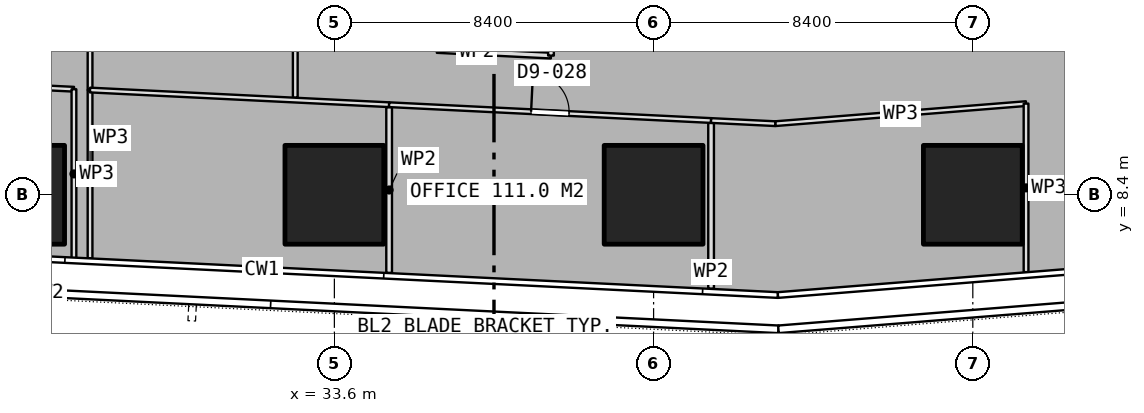
"""IFC4 building model, lengths in metres.
Left out: names, types, materials, properties, quantities, classifications, styles, units other than length and angle.
Written with IfcOpenShell. Run it as: python <this file> out.ifc"""

import sys

from ifc_helpers import new_model, si_unit, direction, frame, frame_2d, origin, origin_2d, place, context, subcontext, project, spatial, rectangle, extrude, element, fill, save


model = new_model("IFC4")
c1 = context("Model", 3, precision=1e-05, world=origin(), true_north=direction((0.0, 1.0)))
c2 = subcontext(c1, "Body", "Model", "MODEL_VIEW")
j1 = project(units=[si_unit("LENGTHUNIT", "METRE"), si_unit("PLANEANGLEUNIT", "RADIAN")], contexts=[c1])
p1 = place(None, origin())
s1 = spatial("IfcSite", under=j1, at=p1, CompositionType="ELEMENT")
p2 = place(p1, origin())
s2 = spatial("IfcBuilding", under=s1, at=p2, CompositionType="ELEMENT")
p3 = place(p2, frame((0.0, 0.0, 29.15)))
s3 = spatial("IfcBuildingStorey", under=s2, at=p3, CompositionType="ELEMENT", Elevation=29.15)
for number, where, z_axis, x_axis in (
    (1, (25.2, 8.4, 0.0), (0.0, 0.0, 1.0), (1.0, 0.0, 0.0)),
    (2, (33.6, 8.4, 0.0), (0.0, 0.0, 1.0), (1.0, 0.0, 0.0)),
    (3, (42.0, 8.4, 0.0), (0.0, 0.0, 1.0), (1.0, 0.0, 0.0)),
    (4, (50.4, 8.4, 0.0), (0.0, 0.0, 1.0), (1.0, 0.0, 0.0)),
):
    element("IfcColumn", number, at=place(p3, frame(where, z_axis=z_axis, x_axis=x_axis)), inside=s3, PredefinedType="COLUMN", context=c2, shape_type="SweptSolid", body=[
        extrude(rectangle(XDim=2.6, YDim=2.6, at=origin_2d()), origin(), (0.0, 0.0, 1.0), 3.75),
    ])
p4 = place(p3, frame((27.171, 11.156, 0.0), z_axis=(0.0, 0.0, 1.0), x_axis=(0.998799184112, -0.048991732132, 0.0)))
e5 = element("IfcWall", 5, at=p4, inside=s3, PredefinedType="PARTITIONING", context=c2, shape_type="SweptSolid", body=[
    extrude(rectangle(XDim=7.879, YDim=0.125, at=frame_2d((3.939, 0.0))), origin(), (0.0, 0.0, 1.0), 3.5),
])
p5 = place(p3, frame((35.04, 10.77, 0.0), z_axis=(0.0, 0.0, 1.0), x_axis=(0.998796515078, -0.049046115723, 0.0)))
e6 = element("IfcWall", 6, at=p5, inside=s3, PredefinedType="PARTITIONING", context=c2, shape_type="SweptSolid", body=[
    extrude(rectangle(XDim=8.482, YDim=0.125, at=frame_2d((4.241, 0.0))), origin(), (0.0, 0.0, 1.0), 3.5),
])
p6 = place(p5, frame((3.741, 0.0, 0.0)))
e7 = element("IfcOpeningElement", 7, at=p6, cuts=e6, PredefinedType="OPENING", context=c2, shape_type="SweptSolid", body=[
    extrude(rectangle(XDim=1.0, YDim=2.1, at=frame_2d((0.5, 1.05))), frame((0.0, 0.073, 0.0), z_axis=(0.0, -1.0, 0.0), x_axis=(1.0, 0.0, 0.0)), (0.0, 0.0, 1.0), 0.145),
])
p7 = place(p3, frame((43.512, 10.354, 0.0), z_axis=(0.0, 0.0, 1.0), x_axis=(0.998795852564, -0.049059605587, 0.0)))
e8 = element("IfcWall", 8, at=p7, inside=s3, PredefinedType="PARTITIONING", context=c2, shape_type="SweptSolid", body=[
    extrude(rectangle(XDim=1.692, YDim=0.125, at=frame_2d((0.846, 0.0))), origin(), (0.0, 0.0, 1.0), 3.5),
])
p8 = place(p3, frame((45.202, 10.271, 0.0), z_axis=(0.0, 0.0, 1.0), x_axis=(0.996813519404, 0.079767208379, 0.0)))
e9 = element("IfcWall", 9, at=p8, inside=s3, PredefinedType="PARTITIONING", context=c2, shape_type="SweptSolid", body=[
    extrude(rectangle(XDim=6.62, YDim=0.125, at=frame_2d((3.31, 0.0))), origin(), (0.0, 0.0, 1.0), 3.5),
])
p9 = place(p3, frame((51.801, 10.799, 0.0), z_axis=(0.0, 0.0, 1.0), x_axis=(0.0, -1.0, 0.0)))
e10 = element("IfcWall", 10, at=p9, inside=s3, PredefinedType="PARTITIONING", context=c2, shape_type="SweptSolid", body=[
    extrude(rectangle(XDim=4.434, YDim=0.125, at=frame_2d((2.217, 0.0))), origin(), (0.0, 0.0, 1.0), 3.5),
])
p10 = place(p3, frame((27.171, 6.731, 0.0), z_axis=(0.0, 0.0, 1.0), x_axis=(0.0, 1.0, 0.0)))
e11 = element("IfcWall", 11, at=p10, inside=s3, PredefinedType="PARTITIONING", context=c2, shape_type="SweptSolid", body=[
    extrude(rectangle(XDim=4.425, YDim=0.125, at=frame_2d((2.212, 0.0))), origin(), (0.0, 0.0, 1.0), 3.5),
])
p11 = place(p3, frame((32.571, 14.0, 0.0), z_axis=(0.0, 0.0, 1.0), x_axis=(0.0, -1.0, 0.0)))
e12 = element("IfcWall", 12, at=p11, inside=s3, PredefinedType="PARTITIONING", context=c2, shape_type="SweptSolid", body=[
    extrude(rectangle(XDim=3.046, YDim=0.125, at=frame_2d((1.523, 0.0))), origin(), (0.0, 0.0, 1.0), 3.5),
])
p12 = place(p3, frame((27.171, 11.156, 0.0), z_axis=(0.0, 0.0, 1.0), x_axis=(0.0, 1.0, 0.0)))
e13 = element("IfcWall", 13, at=p12, inside=s3, PredefinedType="PARTITIONING", context=c2, shape_type="SweptSolid", body=[
    extrude(rectangle(XDim=2.844, YDim=0.125, at=frame_2d((1.422, 0.0))), origin(), (0.0, 0.0, 1.0), 3.5),
])
for number, where, z_axis, x_axis in (
    (14, (43.513, 10.291, 0.0), (0.0, 0.0, 1.0), (0.0, -1.0, 0.0)),
    (15, (35.041, 10.707, 0.0), (0.0, 0.0, 1.0), (0.0, -1.0, 0.0)),
):
    element("IfcWall", number, at=place(p3, frame(where, z_axis=z_axis, x_axis=x_axis)), inside=s3, PredefinedType="PARTITIONING", context=c2, shape_type="SweptSolid", body=[
        extrude(rectangle(XDim=4.363, YDim=0.15, at=frame_2d((2.182, 0.0))), origin(), (0.0, 0.0, 1.0), 3.5),
    ])
p13 = place(p3, frame((36.3, 12.21, 0.0), z_axis=(0.0, 0.0, 1.0), x_axis=(0.998786159732, -0.04925654401, 0.0)))
e16 = element("IfcWall", 16, at=p13, inside=s3, PredefinedType="PARTITIONING", context=c2, shape_type="SweptSolid", body=[
    extrude(rectangle(XDim=3.004, YDim=0.15, at=frame_2d((1.502, 0.0))), origin(), (0.0, 0.0, 1.0), 3.5),
])
p14 = place(p3, frame((39.3, 12.062, 0.0), z_axis=(0.0, 0.0, 1.0), x_axis=(0.0, 1.0, 0.0)))
e17 = element("IfcWall", 17, at=p14, inside=s3, PredefinedType="PARTITIONING", context=c2, shape_type="SweptSolid", body=[
    extrude(rectangle(XDim=1.938, YDim=0.15, at=frame_2d((0.969, 0.0))), origin(), (0.0, 0.0, 1.0), 3.5),
])
p15 = place(p3, frame((18.274, 11.593, 0.0), z_axis=(0.0, 0.0, 1.0), x_axis=(0.998796861193, -0.049039066774, 0.0)))
e18 = element("IfcWall", 18, at=p15, inside=s3, PredefinedType="PARTITIONING", context=c2, shape_type="SweptSolid", body=[
    extrude(rectangle(XDim=8.483, YDim=0.125, at=frame_2d((4.242, 0.0))), origin(), (0.0, 0.0, 1.0), 3.5),
])
p16 = place(p15, frame((3.342, 0.0, 0.0)))
e19 = element("IfcOpeningElement", 19, at=p16, cuts=e18, PredefinedType="OPENING", context=c2, shape_type="SweptSolid", body=[
    extrude(rectangle(XDim=1.8, YDim=2.1, at=frame_2d((0.9, 1.05))), frame((0.0, 0.073, 0.0), z_axis=(0.0, -1.0, 0.0), x_axis=(1.0, 0.0, 0.0)), (0.0, 0.0, 1.0), 0.145),
])
p17 = place(p3, frame((26.747, 11.177, 0.0), z_axis=(0.0, 0.0, 1.0), x_axis=(0.0, -1.0, 0.0)))
e20 = element("IfcWall", 20, at=p17, inside=s3, PredefinedType="PARTITIONING", context=c2, shape_type="SweptSolid", body=[
    extrude(rectangle(XDim=4.455, YDim=0.125, at=frame_2d((2.228, 0.0))), origin(), (0.0, 0.0, 1.0), 3.5),
])
p18 = place(p6, origin())
e21 = element("IfcDoor", 21, at=p18, inside=s3, OperationType="SINGLE_SWING_LEFT", PredefinedType="DOOR", context=c2, shape_type="SweptSolid", body=[
    extrude(rectangle(XDim=1.0, YDim=2.1, at=frame_2d((0.5, 1.05))), frame((0.0, 0.025, 0.0), z_axis=(0.0, -1.0, 0.0), x_axis=(1.0, 0.0, 0.0)), (0.0, 0.0, 1.0), 0.05),
])
fill(e7, e21)
save(model, sys.argv[1])
